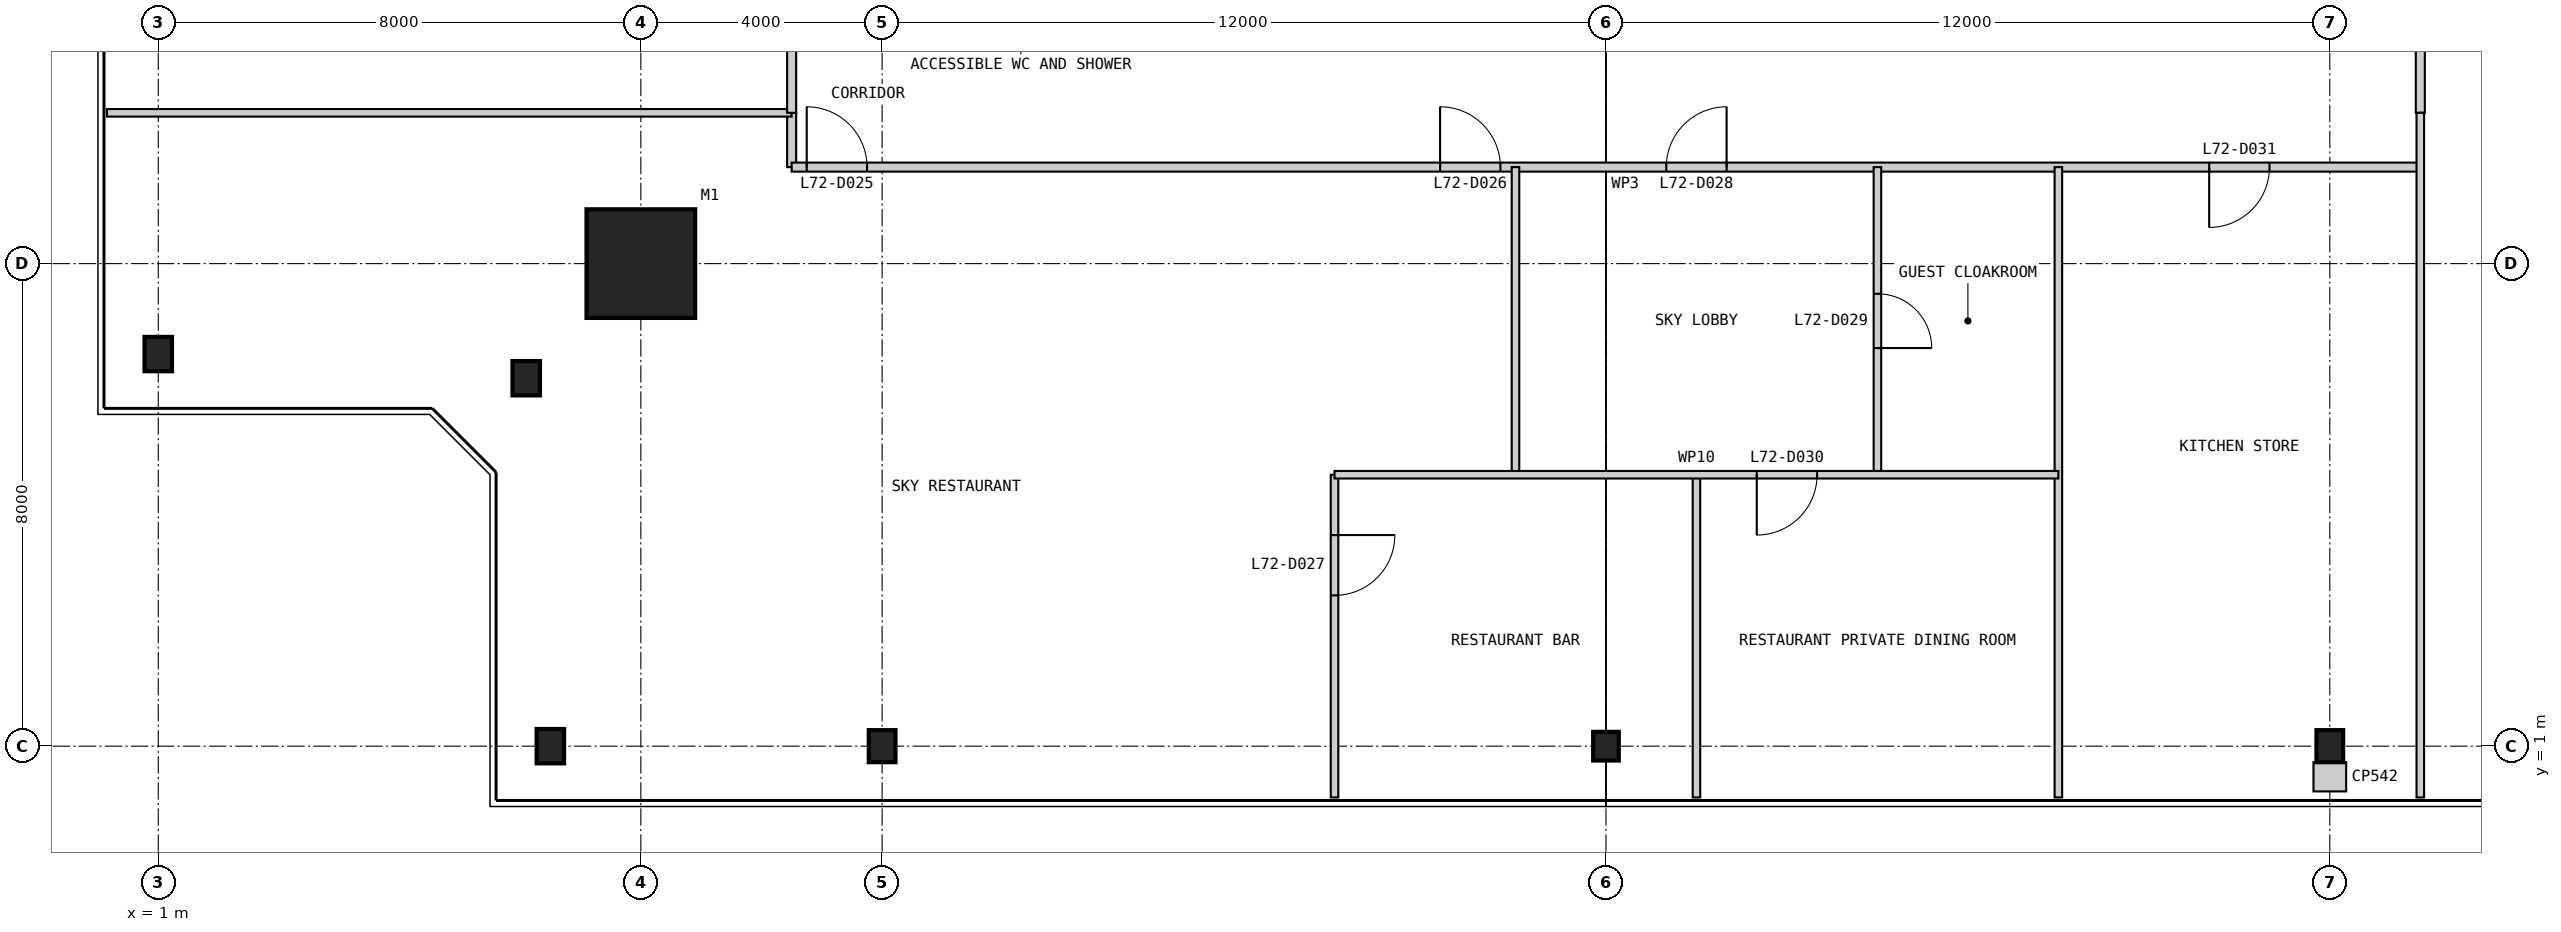
"""IFC4 building model, lengths in metres.
Left out: names, types, materials, properties, quantities, classifications, styles, units other than length and angle.
Written with IfcOpenShell. Run it as: python <this file> out.ifc"""

import sys

from ifc_helpers import new_model, si_unit, direction, frame, frame_2d, origin, origin_2d, place, context, subcontext, project, spatial, rectangle, i_section, extrude, element, fill, save


model = new_model("IFC4")
c1 = context("Model", 3, precision=1e-05, world=origin(), true_north=direction((0.0, 1.0)))
c2 = subcontext(c1, "Body", "Model", "MODEL_VIEW")
j1 = project(units=[si_unit("LENGTHUNIT", "METRE"), si_unit("PLANEANGLEUNIT", "RADIAN")], contexts=[c1])
p1 = place(None, origin())
s1 = spatial("IfcSite", under=j1, at=p1, CompositionType="ELEMENT")
p2 = place(p1, origin())
s2 = spatial("IfcBuilding", under=s1, at=p2, CompositionType="ELEMENT")
p3 = place(p2, frame((0.0, 0.0, 296.8)))
s3 = spatial("IfcBuildingStorey", under=s2, at=p3, CompositionType="ELEMENT", Elevation=296.8)
p4 = place(p3, frame((9.0, 9.0, 0.0), z_axis=(0.0, 0.0, 1.0), x_axis=(1.0, 0.0, 0.0)))
e1 = element("IfcColumn", 1, at=p4, inside=s3, PredefinedType="COLUMN", context=c2, shape_type="SweptSolid", body=[
    extrude(rectangle(XDim=1.8, YDim=1.8, at=origin_2d()), origin(), (0.0, 0.0, 1.0), 5.0),
])
p5 = place(p3, frame((7.5, 1.0, 0.0), z_axis=(0.0, 0.0, 1.0), x_axis=(1.0, 0.0, 0.0)))
e2 = element("IfcColumn", 2, at=p5, inside=s3, PredefinedType="COLUMN", context=c2, shape_type="SweptSolid", body=[
    extrude(i_section(OverallWidth=0.455, OverallDepth=0.569, WebThickness=0.078, FlangeThickness=0.125, at=origin_2d()), origin(), (0.0, 0.0, 1.0), 5.0),
])
p6 = place(p3, frame((13.0, 1.0, 0.0), z_axis=(0.0, 0.0, 1.0), x_axis=(1.0, 0.0, 0.0)))
e3 = element("IfcColumn", 3, at=p6, inside=s3, PredefinedType="COLUMN", context=c2, shape_type="SweptSolid", body=[
    extrude(i_section(OverallWidth=0.442, OverallDepth=0.531, WebThickness=0.066, FlangeThickness=0.106, at=origin_2d()), origin(), (0.0, 0.0, 1.0), 5.0),
])
p7 = place(p3, frame((25.0, 1.0, 0.0), z_axis=(0.0, 0.0, 1.0), x_axis=(1.0, 0.0, 0.0)))
e4 = element("IfcColumn", 4, at=p7, inside=s3, PredefinedType="COLUMN", context=c2, shape_type="SweptSolid", body=[
    extrude(i_section(OverallWidth=0.424, OverallDepth=0.475, WebThickness=0.048, FlangeThickness=0.077, at=origin_2d()), origin(), (0.0, 0.0, 1.0), 5.0),
])
p8 = place(p3, frame((37.0, 1.0, 0.0), z_axis=(0.0, 0.0, 1.0), x_axis=(1.0, 0.0, 0.0)))
e5 = element("IfcColumn", 5, at=p8, inside=s3, PredefinedType="COLUMN", context=c2, shape_type="SweptSolid", body=[
    extrude(i_section(OverallWidth=0.442, OverallDepth=0.531, WebThickness=0.066, FlangeThickness=0.106, at=origin_2d()), origin(), (0.0, 0.0, 1.0), 5.0),
])
for number, where, z_axis, x_axis in (
    (6, (1.0, 7.5, 0.0), (0.0, 0.0, 1.0), (1.0, 0.0, 0.0)),
    (7, (7.1, 7.1, 0.0), (0.0, 0.0, 1.0), (1.0, 0.0, 0.0)),
):
    element("IfcColumn", number, at=place(p3, frame(where, z_axis=z_axis, x_axis=x_axis)), inside=s3, PredefinedType="COLUMN", context=c2, shape_type="SweptSolid", body=[
        extrude(i_section(OverallWidth=0.455, OverallDepth=0.569, WebThickness=0.078, FlangeThickness=0.125, at=origin_2d()), origin(), (0.0, 0.0, 1.0), 5.0),
    ])
p9 = place(p3, frame((11.5, 11.5, 0.0), z_axis=(0.0, 0.0, 1.0), x_axis=(0.0, -1.0, 0.0)))
e8 = element("IfcWall", 8, at=p9, inside=s3, PredefinedType="PARTITIONING", context=c2, shape_type="SweptSolid", body=[
    extrude(rectangle(XDim=0.9, YDim=0.15, at=frame_2d((0.45, 0.0))), origin(), (0.0, 0.0, 1.0), 4.8),
])
p10 = place(p3, frame((11.5, 10.6, 0.0), z_axis=(0.0, 0.0, 1.0), x_axis=(1.0, 0.0, 0.0)))
e9 = element("IfcWall", 9, at=p10, inside=s3, PredefinedType="PARTITIONING", context=c2, shape_type="SweptSolid", body=[
    extrude(rectangle(XDim=27.0, YDim=0.15, at=frame_2d((13.5, 0.0))), origin(), (0.0, 0.0, 1.0), 4.8),
])
p11 = place(p10, frame((0.25, 0.0, 0.0)))
e10 = element("IfcOpeningElement", 10, at=p11, cuts=e9, PredefinedType="OPENING", context=c2, shape_type="SweptSolid", body=[
    extrude(rectangle(XDim=1.0, YDim=2.2, at=frame_2d((0.5, 1.1))), frame((0.0, 0.085, 0.0), z_axis=(0.0, -1.0, 0.0), x_axis=(1.0, 0.0, 0.0)), (0.0, 0.0, 1.0), 0.17),
])
p12 = place(p10, frame((10.75, 0.0, 0.0)))
e11 = element("IfcOpeningElement", 11, at=p12, cuts=e9, PredefinedType="OPENING", context=c2, shape_type="SweptSolid", body=[
    extrude(rectangle(XDim=1.0, YDim=2.2, at=frame_2d((0.5, 1.1))), frame((0.0, 0.085, 0.0), z_axis=(0.0, -1.0, 0.0), x_axis=(1.0, 0.0, 0.0)), (0.0, 0.0, 1.0), 0.17),
])
p13 = place(p10, frame((14.5, 0.0, 0.0)))
e12 = element("IfcOpeningElement", 12, at=p13, cuts=e9, PredefinedType="OPENING", context=c2, shape_type="SweptSolid", body=[
    extrude(rectangle(XDim=1.0, YDim=2.2, at=frame_2d((0.5, 1.1))), frame((0.0, 0.085, 0.0), z_axis=(0.0, -1.0, 0.0), x_axis=(1.0, 0.0, 0.0)), (0.0, 0.0, 1.0), 0.17),
])
p14 = place(p10, frame((23.5, 0.0, 0.0)))
e13 = element("IfcOpeningElement", 13, at=p14, cuts=e9, PredefinedType="OPENING", context=c2, shape_type="SweptSolid", body=[
    extrude(rectangle(XDim=1.0, YDim=2.2, at=frame_2d((0.5, 1.1))), frame((0.0, 0.085, 0.0), z_axis=(0.0, -1.0, 0.0), x_axis=(1.0, 0.0, 0.0)), (0.0, 0.0, 1.0), 0.17),
])
p15 = place(p3, frame((0.15, 11.5, 0.0), z_axis=(0.0, 0.0, 1.0), x_axis=(1.0, 0.0, 0.0)))
e14 = element("IfcWall", 14, at=p15, inside=s3, PredefinedType="PARTITIONING", context=c2, shape_type="SweptSolid", body=[
    extrude(rectangle(XDim=11.35, YDim=0.125, at=frame_2d((5.675, 0.0))), origin(), (0.0, 0.0, 1.0), 4.8),
])
p16 = place(p3, frame((20.5, 0.15, 0.0), z_axis=(0.0, 0.0, 1.0), x_axis=(0.0, 1.0, 0.0)))
e15 = element("IfcWall", 15, at=p16, inside=s3, PredefinedType="PARTITIONING", context=c2, shape_type="SweptSolid", body=[
    extrude(rectangle(XDim=5.35, YDim=0.125, at=frame_2d((2.675, 0.0))), origin(), (0.0, 0.0, 1.0), 4.8),
])
p17 = place(p16, frame((3.35, 0.0, 0.0)))
e16 = element("IfcOpeningElement", 16, at=p17, cuts=e15, PredefinedType="OPENING", context=c2, shape_type="SweptSolid", body=[
    extrude(rectangle(XDim=1.0, YDim=2.2, at=frame_2d((0.5, 1.1))), frame((0.0, 0.073, 0.0), z_axis=(0.0, -1.0, 0.0), x_axis=(1.0, 0.0, 0.0)), (0.0, 0.0, 1.0), 0.145),
])
p18 = place(p3, frame((23.5, 5.5, 0.0), z_axis=(0.0, 0.0, 1.0), x_axis=(0.0, 1.0, 0.0)))
e17 = element("IfcWall", 17, at=p18, inside=s3, PredefinedType="PARTITIONING", context=c2, shape_type="SweptSolid", body=[
    extrude(rectangle(XDim=5.1, YDim=0.125, at=frame_2d((2.55, 0.0))), origin(), (0.0, 0.0, 1.0), 4.8),
])
p19 = place(p3, frame((26.5, 0.15, 0.0), z_axis=(0.0, 0.0, 1.0), x_axis=(0.0, 1.0, 0.0)))
e18 = element("IfcWall", 18, at=p19, inside=s3, PredefinedType="PARTITIONING", context=c2, shape_type="SweptSolid", body=[
    extrude(rectangle(XDim=5.35, YDim=0.125, at=frame_2d((2.675, 0.0))), origin(), (0.0, 0.0, 1.0), 4.8),
])
p20 = place(p3, frame((29.5, 5.5, 0.0), z_axis=(0.0, 0.0, 1.0), x_axis=(0.0, 1.0, 0.0)))
e19 = element("IfcWall", 19, at=p20, inside=s3, PredefinedType="PARTITIONING", context=c2, shape_type="SweptSolid", body=[
    extrude(rectangle(XDim=5.1, YDim=0.125, at=frame_2d((2.55, 0.0))), origin(), (0.0, 0.0, 1.0), 4.8),
])
p21 = place(p20, frame((2.1, 0.0, 0.0)))
e20 = element("IfcOpeningElement", 20, at=p21, cuts=e19, PredefinedType="OPENING", context=c2, shape_type="SweptSolid", body=[
    extrude(rectangle(XDim=0.9, YDim=2.2, at=frame_2d((0.45, 1.1))), frame((0.0, 0.073, 0.0), z_axis=(0.0, -1.0, 0.0), x_axis=(1.0, 0.0, 0.0)), (0.0, 0.0, 1.0), 0.145),
])
p22 = place(p3, frame((32.5, 0.15, 0.0), z_axis=(0.0, 0.0, 1.0), x_axis=(0.0, 1.0, 0.0)))
e21 = element("IfcWall", 21, at=p22, inside=s3, PredefinedType="PARTITIONING", context=c2, shape_type="SweptSolid", body=[
    extrude(rectangle(XDim=10.45, YDim=0.125, at=frame_2d((5.225, 0.0))), origin(), (0.0, 0.0, 1.0), 4.8),
])
p23 = place(p3, frame((20.5, 5.5, 0.0), z_axis=(0.0, 0.0, 1.0), x_axis=(1.0, 0.0, 0.0)))
e22 = element("IfcWall", 22, at=p23, inside=s3, PredefinedType="PARTITIONING", context=c2, shape_type="SweptSolid", body=[
    extrude(rectangle(XDim=12.0, YDim=0.125, at=frame_2d((6.0, 0.0))), origin(), (0.0, 0.0, 1.0), 4.8),
])
p24 = place(p23, frame((7.0, 0.0, 0.0)))
e23 = element("IfcOpeningElement", 23, at=p24, cuts=e22, PredefinedType="OPENING", context=c2, shape_type="SweptSolid", body=[
    extrude(rectangle(XDim=1.0, YDim=2.2, at=frame_2d((0.5, 1.1))), frame((0.0, 0.073, 0.0), z_axis=(0.0, -1.0, 0.0), x_axis=(1.0, 0.0, 0.0)), (0.0, 0.0, 1.0), 0.145),
])
p25 = place(p3, frame((38.5, 11.5, 0.0), z_axis=(0.0, 0.0, 1.0), x_axis=(0.0, 1.0, 0.0)))
e24 = element("IfcWall", 24, at=p25, inside=s3, PredefinedType="PARTITIONING", context=c2, shape_type="SweptSolid", body=[
    extrude(rectangle(XDim=27.0, YDim=0.15, at=frame_2d((13.5, 0.0))), origin(), (0.0, 0.0, 1.0), 4.8),
])
p26 = place(p25, frame((8.5, 0.0, 0.0)))
e25 = element("IfcOpeningElement", 25, at=p26, cuts=e24, PredefinedType="OPENING", context=c2, shape_type="SweptSolid", body=[
    extrude(rectangle(XDim=1.0, YDim=2.2, at=frame_2d((0.5, 1.1))), frame((0.0, 0.085, 0.0), z_axis=(0.0, -1.0, 0.0), x_axis=(1.0, 0.0, 0.0)), (0.0, 0.0, 1.0), 0.17),
])
p27 = place(p25, frame((25.0, 0.0, 0.0)))
e26 = element("IfcOpeningElement", 26, at=p27, cuts=e24, PredefinedType="OPENING", context=c2, shape_type="SweptSolid", body=[
    extrude(rectangle(XDim=1.0, YDim=2.2, at=frame_2d((0.5, 1.1))), frame((0.0, 0.085, 0.0), z_axis=(0.0, -1.0, 0.0), x_axis=(1.0, 0.0, 0.0)), (0.0, 0.0, 1.0), 0.17),
])
p28 = place(p25, frame((22.0, 0.0, 0.0)))
e27 = element("IfcOpeningElement", 27, at=p28, cuts=e24, PredefinedType="OPENING", context=c2, shape_type="SweptSolid", body=[
    extrude(rectangle(XDim=1.0, YDim=2.2, at=frame_2d((0.5, 1.1))), frame((0.0, 0.085, 0.0), z_axis=(0.0, -1.0, 0.0), x_axis=(1.0, 0.0, 0.0)), (0.0, 0.0, 1.0), 0.17),
])
p29 = place(p3, frame((38.5, 0.15, 0.0), z_axis=(0.0, 0.0, 1.0), x_axis=(0.0, 1.0, 0.0)))
e28 = element("IfcWall", 28, at=p29, inside=s3, PredefinedType="PARTITIONING", context=c2, shape_type="SweptSolid", body=[
    extrude(rectangle(XDim=11.35, YDim=0.125, at=frame_2d((5.675, 0.0))), origin(), (0.0, 0.0, 1.0), 4.8),
])
p30 = place(p3, frame((11.5, 38.5, 0.0), z_axis=(0.0, 0.0, 1.0), x_axis=(0.0, -1.0, 0.0)))
e29 = element("IfcWall", 29, at=p30, inside=s3, PredefinedType="PARTITIONING", context=c2, shape_type="SweptSolid", body=[
    extrude(rectangle(XDim=27.0, YDim=0.15, at=frame_2d((13.5, 0.0))), origin(), (0.0, 0.0, 1.0), 4.8),
])
p31 = place(p30, frame((5.5, 0.0, 0.0)))
e30 = element("IfcOpeningElement", 30, at=p31, cuts=e29, PredefinedType="OPENING", context=c2, shape_type="SweptSolid", body=[
    extrude(rectangle(XDim=1.0, YDim=2.2, at=frame_2d((0.5, 1.1))), frame((0.0, 0.085, 0.0), z_axis=(0.0, -1.0, 0.0), x_axis=(1.0, 0.0, 0.0)), (0.0, 0.0, 1.0), 0.17),
])
p32 = place(p30, frame((17.5, 0.0, 0.0)))
e31 = element("IfcOpeningElement", 31, at=p32, cuts=e29, PredefinedType="OPENING", context=c2, shape_type="SweptSolid", body=[
    extrude(rectangle(XDim=1.0, YDim=2.2, at=frame_2d((0.5, 1.1))), frame((0.0, 0.085, 0.0), z_axis=(0.0, -1.0, 0.0), x_axis=(1.0, 0.0, 0.0)), (0.0, 0.0, 1.0), 0.17),
])
p33 = place(p30, frame((23.5, 0.0, 0.0)))
e32 = element("IfcOpeningElement", 32, at=p33, cuts=e29, PredefinedType="OPENING", context=c2, shape_type="SweptSolid", body=[
    extrude(rectangle(XDim=1.0, YDim=2.2, at=frame_2d((0.5, 1.1))), frame((0.0, 0.085, 0.0), z_axis=(0.0, -1.0, 0.0), x_axis=(1.0, 0.0, 0.0)), (0.0, 0.0, 1.0), 0.17),
])
p34 = place(p3, frame((37.0, 0.25, 0.0), z_axis=(0.0, 0.0, 1.0), x_axis=(0.0, 1.0, 0.0)))
e33 = element("IfcWall", 33, at=p34, inside=s3, PredefinedType="PARTITIONING", context=c2, shape_type="SweptSolid", body=[
    extrude(rectangle(XDim=0.485, YDim=0.542, at=frame_2d((0.242, 0.0))), origin(), (0.0, 0.0, 1.0), 4.8),
])
p35 = place(p11, origin())
e34 = element("IfcDoor", 34, at=p35, inside=s3, OperationType="SINGLE_SWING_LEFT", PredefinedType="DOOR", context=c2, shape_type="SweptSolid", body=[
    extrude(rectangle(XDim=1.0, YDim=2.2, at=frame_2d((0.5, 1.1))), frame((0.0, 0.025, 0.0), z_axis=(0.0, -1.0, 0.0), x_axis=(1.0, 0.0, 0.0)), (0.0, 0.0, 1.0), 0.05),
])
fill(e10, e34)
p36 = place(p12, origin())
e35 = element("IfcDoor", 35, at=p36, inside=s3, OperationType="SINGLE_SWING_LEFT", PredefinedType="DOOR", context=c2, shape_type="SweptSolid", body=[
    extrude(rectangle(XDim=1.0, YDim=2.2, at=frame_2d((0.5, 1.1))), frame((0.0, 0.025, 0.0), z_axis=(0.0, -1.0, 0.0), x_axis=(1.0, 0.0, 0.0)), (0.0, 0.0, 1.0), 0.05),
])
fill(e11, e35)
p37 = place(p17, frame((1.0, 0.0, 0.0), z_axis=(0.0, 0.0, 1.0), x_axis=(-1.0, 0.0, 0.0)))
e36 = element("IfcDoor", 36, at=p37, inside=s3, OperationType="SINGLE_SWING_LEFT", PredefinedType="DOOR", context=c2, shape_type="SweptSolid", body=[
    extrude(rectangle(XDim=1.0, YDim=2.2, at=frame_2d((0.5, 1.1))), frame((0.0, 0.025, 0.0), z_axis=(0.0, -1.0, 0.0), x_axis=(1.0, 0.0, 0.0)), (0.0, 0.0, 1.0), 0.05),
])
fill(e16, e36)
p38 = place(p13, origin())
e37 = element("IfcDoor", 37, at=p38, inside=s3, OperationType="SINGLE_SWING_RIGHT", PredefinedType="DOOR", context=c2, shape_type="SweptSolid", body=[
    extrude(rectangle(XDim=1.0, YDim=2.2, at=frame_2d((0.5, 1.1))), frame((0.0, 0.025, 0.0), z_axis=(0.0, -1.0, 0.0), x_axis=(1.0, 0.0, 0.0)), (0.0, 0.0, 1.0), 0.05),
])
fill(e12, e37)
p39 = place(p21, frame((0.9, 0.0, 0.0), z_axis=(0.0, 0.0, 1.0), x_axis=(-1.0, 0.0, 0.0)))
e38 = element("IfcDoor", 38, at=p39, inside=s3, OperationType="SINGLE_SWING_RIGHT", PredefinedType="DOOR", context=c2, shape_type="SweptSolid", body=[
    extrude(rectangle(XDim=0.9, YDim=2.2, at=frame_2d((0.45, 1.1))), frame((0.0, 0.025, 0.0), z_axis=(0.0, -1.0, 0.0), x_axis=(1.0, 0.0, 0.0)), (0.0, 0.0, 1.0), 0.05),
])
fill(e20, e38)
p40 = place(p24, frame((1.0, 0.0, 0.0), z_axis=(0.0, 0.0, 1.0), x_axis=(-1.0, 0.0, 0.0)))
e39 = element("IfcDoor", 39, at=p40, inside=s3, OperationType="SINGLE_SWING_RIGHT", PredefinedType="DOOR", context=c2, shape_type="SweptSolid", body=[
    extrude(rectangle(XDim=1.0, YDim=2.2, at=frame_2d((0.5, 1.1))), frame((0.0, 0.025, 0.0), z_axis=(0.0, -1.0, 0.0), x_axis=(1.0, 0.0, 0.0)), (0.0, 0.0, 1.0), 0.05),
])
fill(e23, e39)
p41 = place(p14, frame((1.0, 0.0, 0.0), z_axis=(0.0, 0.0, 1.0), x_axis=(-1.0, 0.0, 0.0)))
e40 = element("IfcDoor", 40, at=p41, inside=s3, OperationType="SINGLE_SWING_RIGHT", PredefinedType="DOOR", context=c2, shape_type="SweptSolid", body=[
    extrude(rectangle(XDim=1.0, YDim=2.2, at=frame_2d((0.5, 1.1))), frame((0.0, 0.025, 0.0), z_axis=(0.0, -1.0, 0.0), x_axis=(1.0, 0.0, 0.0)), (0.0, 0.0, 1.0), 0.05),
])
fill(e13, e40)
save(model, sys.argv[1])
